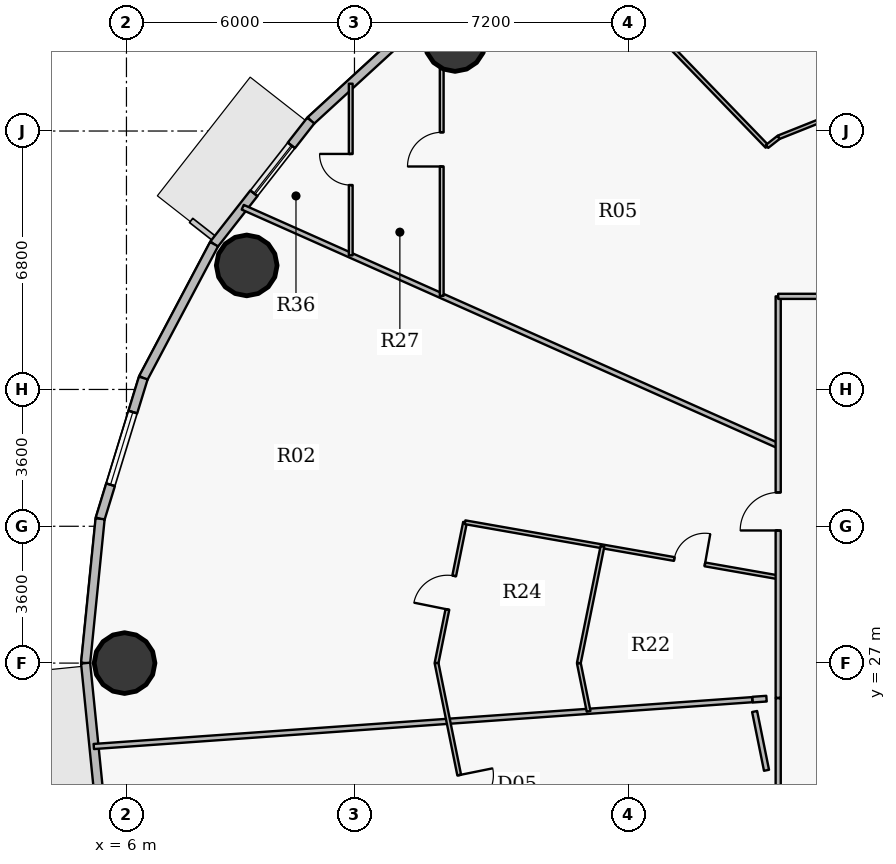
"""IFC4 building model, lengths in metres.
Left out: names, types, materials, properties, quantities, classifications, styles, units other than length and angle.
Written with IfcOpenShell. Run it as: python <this file> out.ifc"""

import sys

from ifc_helpers import new_model, si_unit, direction, frame, frame_2d, origin, origin_2d, place, context, subcontext, project, spatial, rectangle, hollow_circle, extrude, source, transform, mapped, element, fill, save


model = new_model("IFC4")
c1 = context("Model", 3, precision=1e-05, world=origin(), true_north=direction((0.0, 1.0)))
c2 = subcontext(c1, "Body", "Model", "MODEL_VIEW")
j1 = project(units=[si_unit("LENGTHUNIT", "METRE"), si_unit("PLANEANGLEUNIT", "RADIAN")], contexts=[c1])
p1 = place(None, origin())
s1 = spatial("IfcSite", under=j1, at=p1, CompositionType="ELEMENT")
p2 = place(p1, origin())
s2 = spatial("IfcBuilding", under=s1, at=p2, CompositionType="ELEMENT")
p3 = place(p2, frame((0.0, 0.0, 66.0)))
s3 = spatial("IfcBuildingStorey", under=s2, at=p3, CompositionType="ELEMENT", Elevation=66.0)
for number, where, z_axis, x_axis in (
    (1, (14.647, 43.369, 0.0), (0.0, 0.0, 1.0), (1.0, 0.0, 0.0)),
    (2, (9.165, 37.464, 0.0), (0.0, 0.0, 1.0), (1.0, 0.0, 0.0)),
    (3, (5.95, 27.0, 0.0), (0.0, 0.0, 1.0), (1.0, 0.0, 0.0)),
):
    element("IfcColumn", number, at=place(p3, frame(where, z_axis=z_axis, x_axis=x_axis)), inside=s3, PredefinedType="COLUMN", context=c2, shape_type="SweptSolid", body=[
        extrude(hollow_circle(Radius=0.8, WallThickness=0.045, at=origin_2d()), origin(), (0.0, 0.0, 1.0), 4.2),
    ])
p4 = place(p3, frame((10.85, 41.275, 0.0), z_axis=(0.0, 0.0, 1.0), x_axis=(0.737116376281, 0.67576582321, 0.0)))
e4 = element("IfcWall", 4, at=p4, inside=s3, PredefinedType="SOLIDWALL", context=c2, shape_type="SweptSolid", body=[
    extrude(rectangle(XDim=4.294, YDim=0.24, at=frame_2d((2.147, 0.0))), origin(), (0.0, 0.0, 1.0), 3.95),
])
p5 = place(p3, frame((8.305, 38.023, 0.0), z_axis=(0.0, 0.0, 1.0), x_axis=(0.616295508253, 0.787514981767, 0.0)))
e5 = element("IfcWall", 5, at=p5, inside=s3, PredefinedType="SOLIDWALL", context=c2, shape_type="SweptSolid", body=[
    extrude(rectangle(XDim=4.129, YDim=0.24, at=frame_2d((2.065, 0.0))), origin(), (0.0, 0.0, 1.0), 3.95),
])
p6 = place(p5, frame((1.701, 0.0, 0.9)))
e6 = element("IfcOpeningElement", 6, at=p6, cuts=e5, PredefinedType="OPENING", context=c2, shape_type="SweptSolid", body=[
    extrude(rectangle(XDim=1.6, YDim=1.75, at=origin_2d()), frame((0.8, 0.13, 0.875), z_axis=(0.0, -1.0, 0.0), x_axis=(1.0, 0.0, 0.0)), (0.0, 0.0, 1.0), 0.26),
])
p7 = place(p3, frame((6.442, 34.501, 0.0), z_axis=(0.0, 0.0, 1.0), x_axis=(0.467662443071, 0.883907144072, 0.0)))
e7 = element("IfcWall", 7, at=p7, inside=s3, PredefinedType="SOLIDWALL", context=c2, shape_type="SweptSolid", body=[
    extrude(rectangle(XDim=3.984, YDim=0.24, at=frame_2d((1.992, 0.0))), origin(), (0.0, 0.0, 1.0), 3.95),
])
p8 = place(p3, frame((5.307, 30.797, 0.0), z_axis=(0.0, 0.0, 1.0), x_axis=(0.293111631758, 0.956078224482, 0.0)))
e8 = element("IfcWall", 8, at=p8, inside=s3, PredefinedType="SOLIDWALL", context=c2, shape_type="SweptSolid", body=[
    extrude(rectangle(XDim=3.875, YDim=0.24, at=frame_2d((1.938, 0.0))), origin(), (0.0, 0.0, 1.0), 3.95),
])
p9 = place(p8, frame((0.938, 0.0, 0.9)))
e9 = element("IfcOpeningElement", 9, at=p9, cuts=e8, PredefinedType="OPENING", context=c2, shape_type="SweptSolid", body=[
    extrude(rectangle(XDim=2.0, YDim=1.75, at=origin_2d()), frame((1.0, 0.13, 0.875), z_axis=(0.0, -1.0, 0.0), x_axis=(1.0, 0.0, 0.0)), (0.0, 0.0, 1.0), 0.26),
])
for number, where, z_axis, x_axis in (
    (10, (4.925, 27.0, 0.0), (0.0, 0.0, 1.0), (0.1, 0.995, 0.0)),
    (11, (5.307, 23.203, 0.0), (0.0, 0.0, 1.0), (-0.1, 0.995, 0.0)),
):
    element("IfcWall", number, at=place(p3, frame(where, z_axis=z_axis, x_axis=x_axis)), inside=s3, PredefinedType="SOLIDWALL", context=c2, shape_type="SweptSolid", body=[
        extrude(rectangle(XDim=3.816, YDim=0.24, at=frame_2d((1.908, 0.0))), origin(), (0.0, 0.0, 1.0), 3.95),
    ])
p10 = place(p3, frame((5.141, 24.805, 0.0), z_axis=(0.0, 0.0, 1.0), x_axis=(0.99748069861, 0.070938395112, 0.0)))
e12 = element("IfcWall", 12, at=p10, inside=s3, PredefinedType="PARTITIONING", context=c2, shape_type="SweptSolid", body=[
    extrude(rectangle(XDim=17.37, YDim=0.135, at=frame_2d((8.685, 0.0))), origin(), (0.0, 0.0, 1.0), 3.335),
])
p11 = place(p3, frame((9.06, 38.995, 0.0), z_axis=(0.0, 0.0, 1.0), x_axis=(0.913545036193, -0.406737589666, 0.0)))
e13 = element("IfcWall", 13, at=p11, inside=s3, PredefinedType="PARTITIONING", context=c2, shape_type="SweptSolid", body=[
    extrude(rectangle(XDim=15.424, YDim=0.135, at=frame_2d((7.712, 0.0))), origin(), (0.0, 0.0, 1.0), 3.335),
])
p12 = place(p3, frame((11.902, 37.729, 0.0), z_axis=(0.0, 0.0, 1.0), x_axis=(0.0, 1.0, 0.0)))
e14 = element("IfcWall", 14, at=p12, inside=s3, PredefinedType="PARTITIONING", context=c2, shape_type="SweptSolid", body=[
    extrude(rectangle(XDim=4.516, YDim=0.1, at=frame_2d((2.258, 0.0))), origin(), (0.0, 0.0, 1.0), 3.335),
])
p13 = place(p12, frame((1.848, 0.0, 0.0)))
e15 = element("IfcOpeningElement", 15, at=p13, cuts=e14, PredefinedType="OPENING", context=c2, shape_type="SweptSolid", body=[
    extrude(rectangle(XDim=0.82, YDim=2.1, at=origin_2d()), frame((0.41, 0.06, 1.05), z_axis=(0.0, -1.0, 0.0), x_axis=(1.0, 0.0, 0.0)), (0.0, 0.0, 1.0), 0.12),
])
p14 = place(p3, frame((14.16, 27.0, 0.0), z_axis=(0.0, 0.0, 1.0), x_axis=(0.198288618329, 0.980143675101, 0.0)))
e16 = element("IfcWall", 16, at=p14, inside=s3, PredefinedType="PARTITIONING", context=c2, shape_type="SweptSolid", body=[
    extrude(rectangle(XDim=3.781, YDim=0.1, at=frame_2d((1.891, 0.0))), origin(), (0.0, 0.0, 1.0), 3.285),
])
p15 = place(p14, frame((1.44, 0.0, 0.0)))
e17 = element("IfcOpeningElement", 17, at=p15, cuts=e16, PredefinedType="OPENING", context=c2, shape_type="SweptSolid", body=[
    extrude(rectangle(XDim=0.9, YDim=2.1, at=origin_2d()), frame((0.45, 0.06, 1.05), z_axis=(0.0, -1.0, 0.0), x_axis=(1.0, 0.0, 0.0)), (0.0, 0.0, 1.0), 0.12),
])
p16 = place(p3, frame((14.16, 27.0, 0.0), z_axis=(0.0, 0.0, 1.0), x_axis=(0.198292702032, -0.980142848936, 0.0)))
e18 = element("IfcWall", 18, at=p16, inside=s3, PredefinedType="PARTITIONING", context=c2, shape_type="SweptSolid", body=[
    extrude(rectangle(XDim=5.392, YDim=0.1, at=frame_2d((2.696, 0.0))), origin(), (0.0, 0.0, 1.0), 3.285),
])
p17 = place(p16, frame((3.007, 0.0, 0.0)))
e19 = element("IfcOpeningElement", 19, at=p17, cuts=e18, PredefinedType="OPENING", context=c2, shape_type="SweptSolid", body=[
    extrude(rectangle(XDim=0.9, YDim=2.1, at=origin_2d()), frame((0.45, 0.06, 1.05), z_axis=(0.0, -1.0, 0.0), x_axis=(1.0, 0.0, 0.0)), (0.0, 0.0, 1.0), 0.12),
])
p18 = place(p3, frame((14.296, 36.663, 0.0), z_axis=(0.0, 0.0, 1.0), x_axis=(0.0, 1.0, 0.0)))
e20 = element("IfcWall", 20, at=p18, inside=s3, PredefinedType="PARTITIONING", context=c2, shape_type="SweptSolid", body=[
    extrude(rectangle(XDim=7.706, YDim=0.1, at=frame_2d((3.853, 0.0))), origin(), (0.0, 0.0, 1.0), 3.335),
])
p19 = place(p18, frame((3.403, 0.0, 0.0)))
e21 = element("IfcOpeningElement", 21, at=p19, cuts=e20, PredefinedType="OPENING", context=c2, shape_type="SweptSolid", body=[
    extrude(rectangle(XDim=0.9, YDim=2.1, at=origin_2d()), frame((0.45, 0.06, 1.05), z_axis=(0.0, -1.0, 0.0), x_axis=(1.0, 0.0, 0.0)), (0.0, 0.0, 1.0), 0.12),
])
p20 = place(p3, frame((14.91, 30.706, 0.0), z_axis=(0.0, 0.0, 1.0), x_axis=(0.984910199579, -0.173066168747, 0.0)))
e22 = element("IfcWall", 22, at=p20, inside=s3, PredefinedType="PARTITIONING", context=c2, shape_type="SweptSolid", body=[
    extrude(rectangle(XDim=8.367, YDim=0.1, at=frame_2d((4.183, 0.0))), origin(), (0.0, 0.0, 1.0), 3.95),
])
p21 = place(p20, frame((5.589, 0.0, 0.0)))
e23 = element("IfcOpeningElement", 23, at=p21, cuts=e22, PredefinedType="OPENING", context=c2, shape_type="SweptSolid", body=[
    extrude(rectangle(XDim=0.82, YDim=2.1, at=origin_2d()), frame((0.41, 0.06, 1.05), z_axis=(0.0, -1.0, 0.0), x_axis=(1.0, 0.0, 0.0)), (0.0, 0.0, 1.0), 0.12),
])
p22 = place(p3, frame((17.278, 46.364, 0.0), z_axis=(0.0, 0.0, 1.0), x_axis=(0.695065082159, -0.718946821096, 0.0)))
e24 = element("IfcWall", 24, at=p22, inside=s3, PredefinedType="PARTITIONING", context=c2, shape_type="SweptSolid", body=[
    extrude(rectangle(XDim=8.025, YDim=0.1, at=frame_2d((4.012, 0.0))), origin(), (0.0, 0.0, 1.0), 3.335),
])
p23 = place(p22, frame((3.562, 0.0, 0.0)))
e25 = element("IfcOpeningElement", 25, at=p23, cuts=e24, PredefinedType="OPENING", context=c2, shape_type="SweptSolid", body=[
    extrude(rectangle(XDim=0.9, YDim=2.1, at=origin_2d()), frame((0.45, 0.06, 1.05), z_axis=(0.0, -1.0, 0.0), x_axis=(1.0, 0.0, 0.0)), (0.0, 0.0, 1.0), 0.12),
])
p24 = place(p3, frame((17.904, 27.0, 0.0), z_axis=(0.0, 0.0, 1.0), x_axis=(0.198255955876, -0.980150282334, 0.0)))
e26 = element("IfcWall", 26, at=p24, inside=s3, PredefinedType="PARTITIONING", context=c2, shape_type="SweptSolid", body=[
    extrude(rectangle(XDim=1.294, YDim=0.1, at=frame_2d((0.647, 0.0))), origin(), (0.0, 0.0, 1.0), 3.285),
])
p25 = place(p3, frame((17.904, 27.0, 0.0), z_axis=(0.0, 0.0, 1.0), x_axis=(0.198258794433, 0.980149708172, 0.0)))
e27 = element("IfcWall", 27, at=p25, inside=s3, PredefinedType="PARTITIONING", context=c2, shape_type="SweptSolid", body=[
    extrude(rectangle(XDim=3.133, YDim=0.1, at=frame_2d((1.566, 0.0))), origin(), (0.0, 0.0, 1.0), 3.285),
])
p26 = place(p3, frame((21.018, 48.242, 0.0), z_axis=(0.0, 0.0, 1.0), x_axis=(0.576363688098, -0.817193305799, 0.0)))
e28 = element("IfcWall", 28, at=p26, inside=s3, PredefinedType="PARTITIONING", context=c2, shape_type="SweptSolid", body=[
    extrude(rectangle(XDim=7.891, YDim=0.1, at=frame_2d((3.946, 0.0))), origin(), (0.0, 0.0, 1.0), 3.335),
])
p27 = place(p3, frame((22.856, 40.595, 0.0), z_axis=(0.0, 0.0, 1.0), x_axis=(0.787425680638, 0.616409602027, 0.0)))
e29 = element("IfcWall", 29, at=p27, inside=s3, PredefinedType="PARTITIONING", context=c2, shape_type="SweptSolid", body=[
    extrude(rectangle(XDim=0.39, YDim=0.1, at=frame_2d((0.195, 0.0))), origin(), (0.0, 0.0, 1.0), 3.95),
])
p28 = place(p3, frame((23.15, 26.086, 0.0), z_axis=(0.0, 0.0, 1.0), x_axis=(0.0, 1.0, 0.0)))
e30 = element("IfcWall", 30, at=p28, inside=s3, PredefinedType="PARTITIONING", context=c2, shape_type="SweptSolid", body=[
    extrude(rectangle(XDim=10.564, YDim=0.135, at=frame_2d((5.282, 0.0))), origin(), (0.0, 0.0, 1.0), 3.285),
])
p29 = place(p28, frame((4.403, 0.0, 0.0)))
e31 = element("IfcOpeningElement", 31, at=p29, cuts=e30, PredefinedType="OPENING", context=c2, shape_type="SweptSolid", body=[
    extrude(rectangle(XDim=1.0, YDim=2.15, at=origin_2d()), frame((0.5, 0.078, 1.075), z_axis=(0.0, -1.0, 0.0), x_axis=(1.0, 0.0, 0.0)), (0.0, 0.0, 1.0), 0.155),
])
p30 = place(p3, frame((23.15, 36.65, 0.0), z_axis=(0.0, 0.0, 1.0), x_axis=(1.0, 0.0, 0.0)))
e32 = element("IfcWall", 32, at=p30, inside=s3, PredefinedType="PARTITIONING", context=c2, shape_type="SweptSolid", body=[
    extrude(rectangle(XDim=7.171, YDim=0.135, at=frame_2d((3.586, 0.0))), origin(), (0.0, 0.0, 1.0), 3.285),
])
p31 = place(p30, frame((3.086, 0.0, 0.0)))
e33 = element("IfcOpeningElement", 33, at=p31, cuts=e32, PredefinedType="OPENING", context=c2, shape_type="SweptSolid", body=[
    extrude(rectangle(XDim=1.0, YDim=2.15, at=origin_2d()), frame((0.5, 0.078, 1.075), z_axis=(0.0, -1.0, 0.0), x_axis=(1.0, 0.0, 0.0)), (0.0, 0.0, 1.0), 0.155),
])
p32 = place(p3, frame((23.163, 40.835, 0.0), z_axis=(0.0, 0.0, 1.0), x_axis=(0.928807683782, 0.370562122386, 0.0)))
e34 = element("IfcWall", 34, at=p32, inside=s3, PredefinedType="PARTITIONING", context=c2, shape_type="SweptSolid", body=[
    extrude(rectangle(XDim=6.555, YDim=0.1, at=frame_2d((3.277, 0.0))), origin(), (0.0, 0.0, 1.0), 3.285),
])
p33 = place(p32, frame((4.101, 0.0, 0.0)))
e35 = element("IfcOpeningElement", 35, at=p33, cuts=e34, PredefinedType="OPENING", context=c2, shape_type="SweptSolid", body=[
    extrude(rectangle(XDim=0.9, YDim=2.1, at=origin_2d()), frame((0.45, 0.06, 1.05), z_axis=(0.0, -1.0, 0.0), x_axis=(1.0, 0.0, 0.0)), (0.0, 0.0, 1.0), 0.12),
])
p34 = place(p3, frame((23.15, 23.372, 0.0), z_axis=(0.0, 0.0, 1.0), x_axis=(0.0, 1.0, 0.0)))
e36 = element("IfcWall", 36, at=p34, inside=s3, PredefinedType="PARTITIONING", context=c2, shape_type="SweptSolid", body=[
    extrude(rectangle(XDim=2.705, YDim=0.135, at=frame_2d((1.352, 0.0))), origin(), (0.0, 0.0, 1.0), 3.285),
])
p35 = place(p3, frame((22.843, 26.064, 0.0), z_axis=(0.0, 0.0, 1.0), x_axis=(-0.997509116352, -0.070537669335, 0.0)))
e37 = element("IfcWall", 37, at=p35, inside=s3, PredefinedType="PARTITIONING", context=c2, shape_type="SweptSolid", body=[
    extrude(rectangle(XDim=0.367, YDim=0.15, at=frame_2d((0.184, 0.0))), origin(), (0.0, 0.0, 1.0), 3.95),
])
p36 = place(p3, frame((22.53, 25.726, 0.0), z_axis=(0.0, 0.0, 1.0), x_axis=(0.198347121698, -0.980131837721, 0.0)))
e38 = element("IfcWall", 38, at=p36, inside=s3, PredefinedType="PARTITIONING", context=c2, shape_type="SweptSolid", body=[
    extrude(rectangle(XDim=1.578, YDim=0.135, at=frame_2d((0.789, 0.0))), origin(), (0.0, 0.0, 1.0), 3.95),
])
m1 = source(origin(), c2, "Body", "SweptSolid", [
    extrude(rectangle(XDim=1.6, YDim=1.75, at=origin_2d()), frame((0.8, 0.03, 0.875), z_axis=(0.0, -1.0, 0.0), x_axis=(1.0, 0.0, 0.0)), (0.0, 0.0, 1.0), 0.06),
])
p37 = place(p6, origin())
e39 = element("IfcWindow", 39, at=p37, inside=s3, PartitioningType="DOUBLE_PANEL_VERTICAL", PredefinedType="WINDOW", context=c2, shape_type="MappedRepresentation", body=[
    mapped(m1, transform((0.0, 0.0, 0.0), x_axis=(1.0, 0.0, 0.0), y_axis=(0.0, 1.0, 0.0), z_axis=(0.0, 0.0, 1.0), scale=1.0)),
])
fill(e6, e39)
m2 = source(origin(), c2, "Body", "SweptSolid", [
    extrude(rectangle(XDim=2.0, YDim=1.75, at=origin_2d()), frame((1.0, 0.03, 0.875), z_axis=(0.0, -1.0, 0.0), x_axis=(1.0, 0.0, 0.0)), (0.0, 0.0, 1.0), 0.06),
])
p38 = place(p9, origin())
e40 = element("IfcWindow", 40, at=p38, inside=s3, PartitioningType="DOUBLE_PANEL_VERTICAL", PredefinedType="WINDOW", context=c2, shape_type="MappedRepresentation", body=[
    mapped(m2, transform((0.0, 0.0, 0.0), x_axis=(1.0, 0.0, 0.0), y_axis=(0.0, 1.0, 0.0), z_axis=(0.0, 0.0, 1.0), scale=1.0)),
])
fill(e9, e40)
m3 = source(origin(), c2, "Body", "SweptSolid", [
    extrude(rectangle(XDim=0.9, YDim=2.1, at=origin_2d()), frame((0.45, 0.025, 1.05), z_axis=(0.0, -1.0, 0.0), x_axis=(1.0, 0.0, 0.0)), (0.0, 0.0, 1.0), 0.05),
])
p39 = place(p19, origin())
e41 = element("IfcDoor", 41, at=p39, inside=s3, OperationType="SINGLE_SWING_LEFT", PredefinedType="DOOR", context=c2, shape_type="MappedRepresentation", body=[
    mapped(m3, transform((0.0, 0.0, 0.0), x_axis=(1.0, 0.0, 0.0), y_axis=(0.0, 1.0, 0.0), z_axis=(0.0, 0.0, 1.0), scale=1.0)),
])
fill(e21, e41)
m4 = source(origin(), c2, "Body", "SweptSolid", [
    extrude(rectangle(XDim=0.82, YDim=2.1, at=origin_2d()), frame((0.41, 0.025, 1.05), z_axis=(0.0, -1.0, 0.0), x_axis=(1.0, 0.0, 0.0)), (0.0, 0.0, 1.0), 0.05),
])
p40 = place(p13, origin())
e42 = element("IfcDoor", 42, at=p40, inside=s3, OperationType="SINGLE_SWING_RIGHT", PredefinedType="DOOR", context=c2, shape_type="MappedRepresentation", body=[
    mapped(m4, transform((0.0, 0.0, 0.0), x_axis=(1.0, 0.0, 0.0), y_axis=(0.0, 1.0, 0.0), z_axis=(0.0, 0.0, 1.0), scale=1.0)),
])
fill(e15, e42)
m5 = source(origin(), c2, "Body", "SweptSolid", [
    extrude(rectangle(XDim=1.0, YDim=2.15, at=origin_2d()), frame((0.5, 0.025, 1.075), z_axis=(0.0, -1.0, 0.0), x_axis=(1.0, 0.0, 0.0)), (0.0, 0.0, 1.0), 0.05),
])
p41 = place(p29, origin())
e43 = element("IfcDoor", 43, at=p41, inside=s3, OperationType="SINGLE_SWING_LEFT", PredefinedType="DOOR", context=c2, shape_type="MappedRepresentation", body=[
    mapped(m5, transform((0.0, 0.0, 0.0), x_axis=(1.0, 0.0, 0.0), y_axis=(0.0, 1.0, 0.0), z_axis=(0.0, 0.0, 1.0), scale=1.0)),
])
fill(e31, e43)
p42 = place(p21, origin())
e44 = element("IfcDoor", 44, at=p42, inside=s3, OperationType="SINGLE_SWING_RIGHT", PredefinedType="DOOR", context=c2, shape_type="MappedRepresentation", body=[
    mapped(m4, transform((0.0, 0.0, 0.0), x_axis=(1.0, 0.0, 0.0), y_axis=(0.0, 1.0, 0.0), z_axis=(0.0, 0.0, 1.0), scale=1.0)),
])
fill(e23, e44)
p43 = place(p15, origin())
e45 = element("IfcDoor", 45, at=p43, inside=s3, OperationType="SINGLE_SWING_LEFT", PredefinedType="DOOR", context=c2, shape_type="MappedRepresentation", body=[
    mapped(m3, transform((0.0, 0.0, 0.0), x_axis=(1.0, 0.0, 0.0), y_axis=(0.0, 1.0, 0.0), z_axis=(0.0, 0.0, 1.0), scale=1.0)),
])
fill(e17, e45)
p44 = place(p17, origin())
e46 = element("IfcDoor", 46, at=p44, inside=s3, OperationType="SINGLE_SWING_LEFT", PredefinedType="DOOR", context=c2, shape_type="MappedRepresentation", body=[
    mapped(m3, transform((0.0, 0.0, 0.0), x_axis=(1.0, 0.0, 0.0), y_axis=(0.0, 1.0, 0.0), z_axis=(0.0, 0.0, 1.0), scale=1.0)),
])
fill(e19, e46)
save(model, sys.argv[1])
